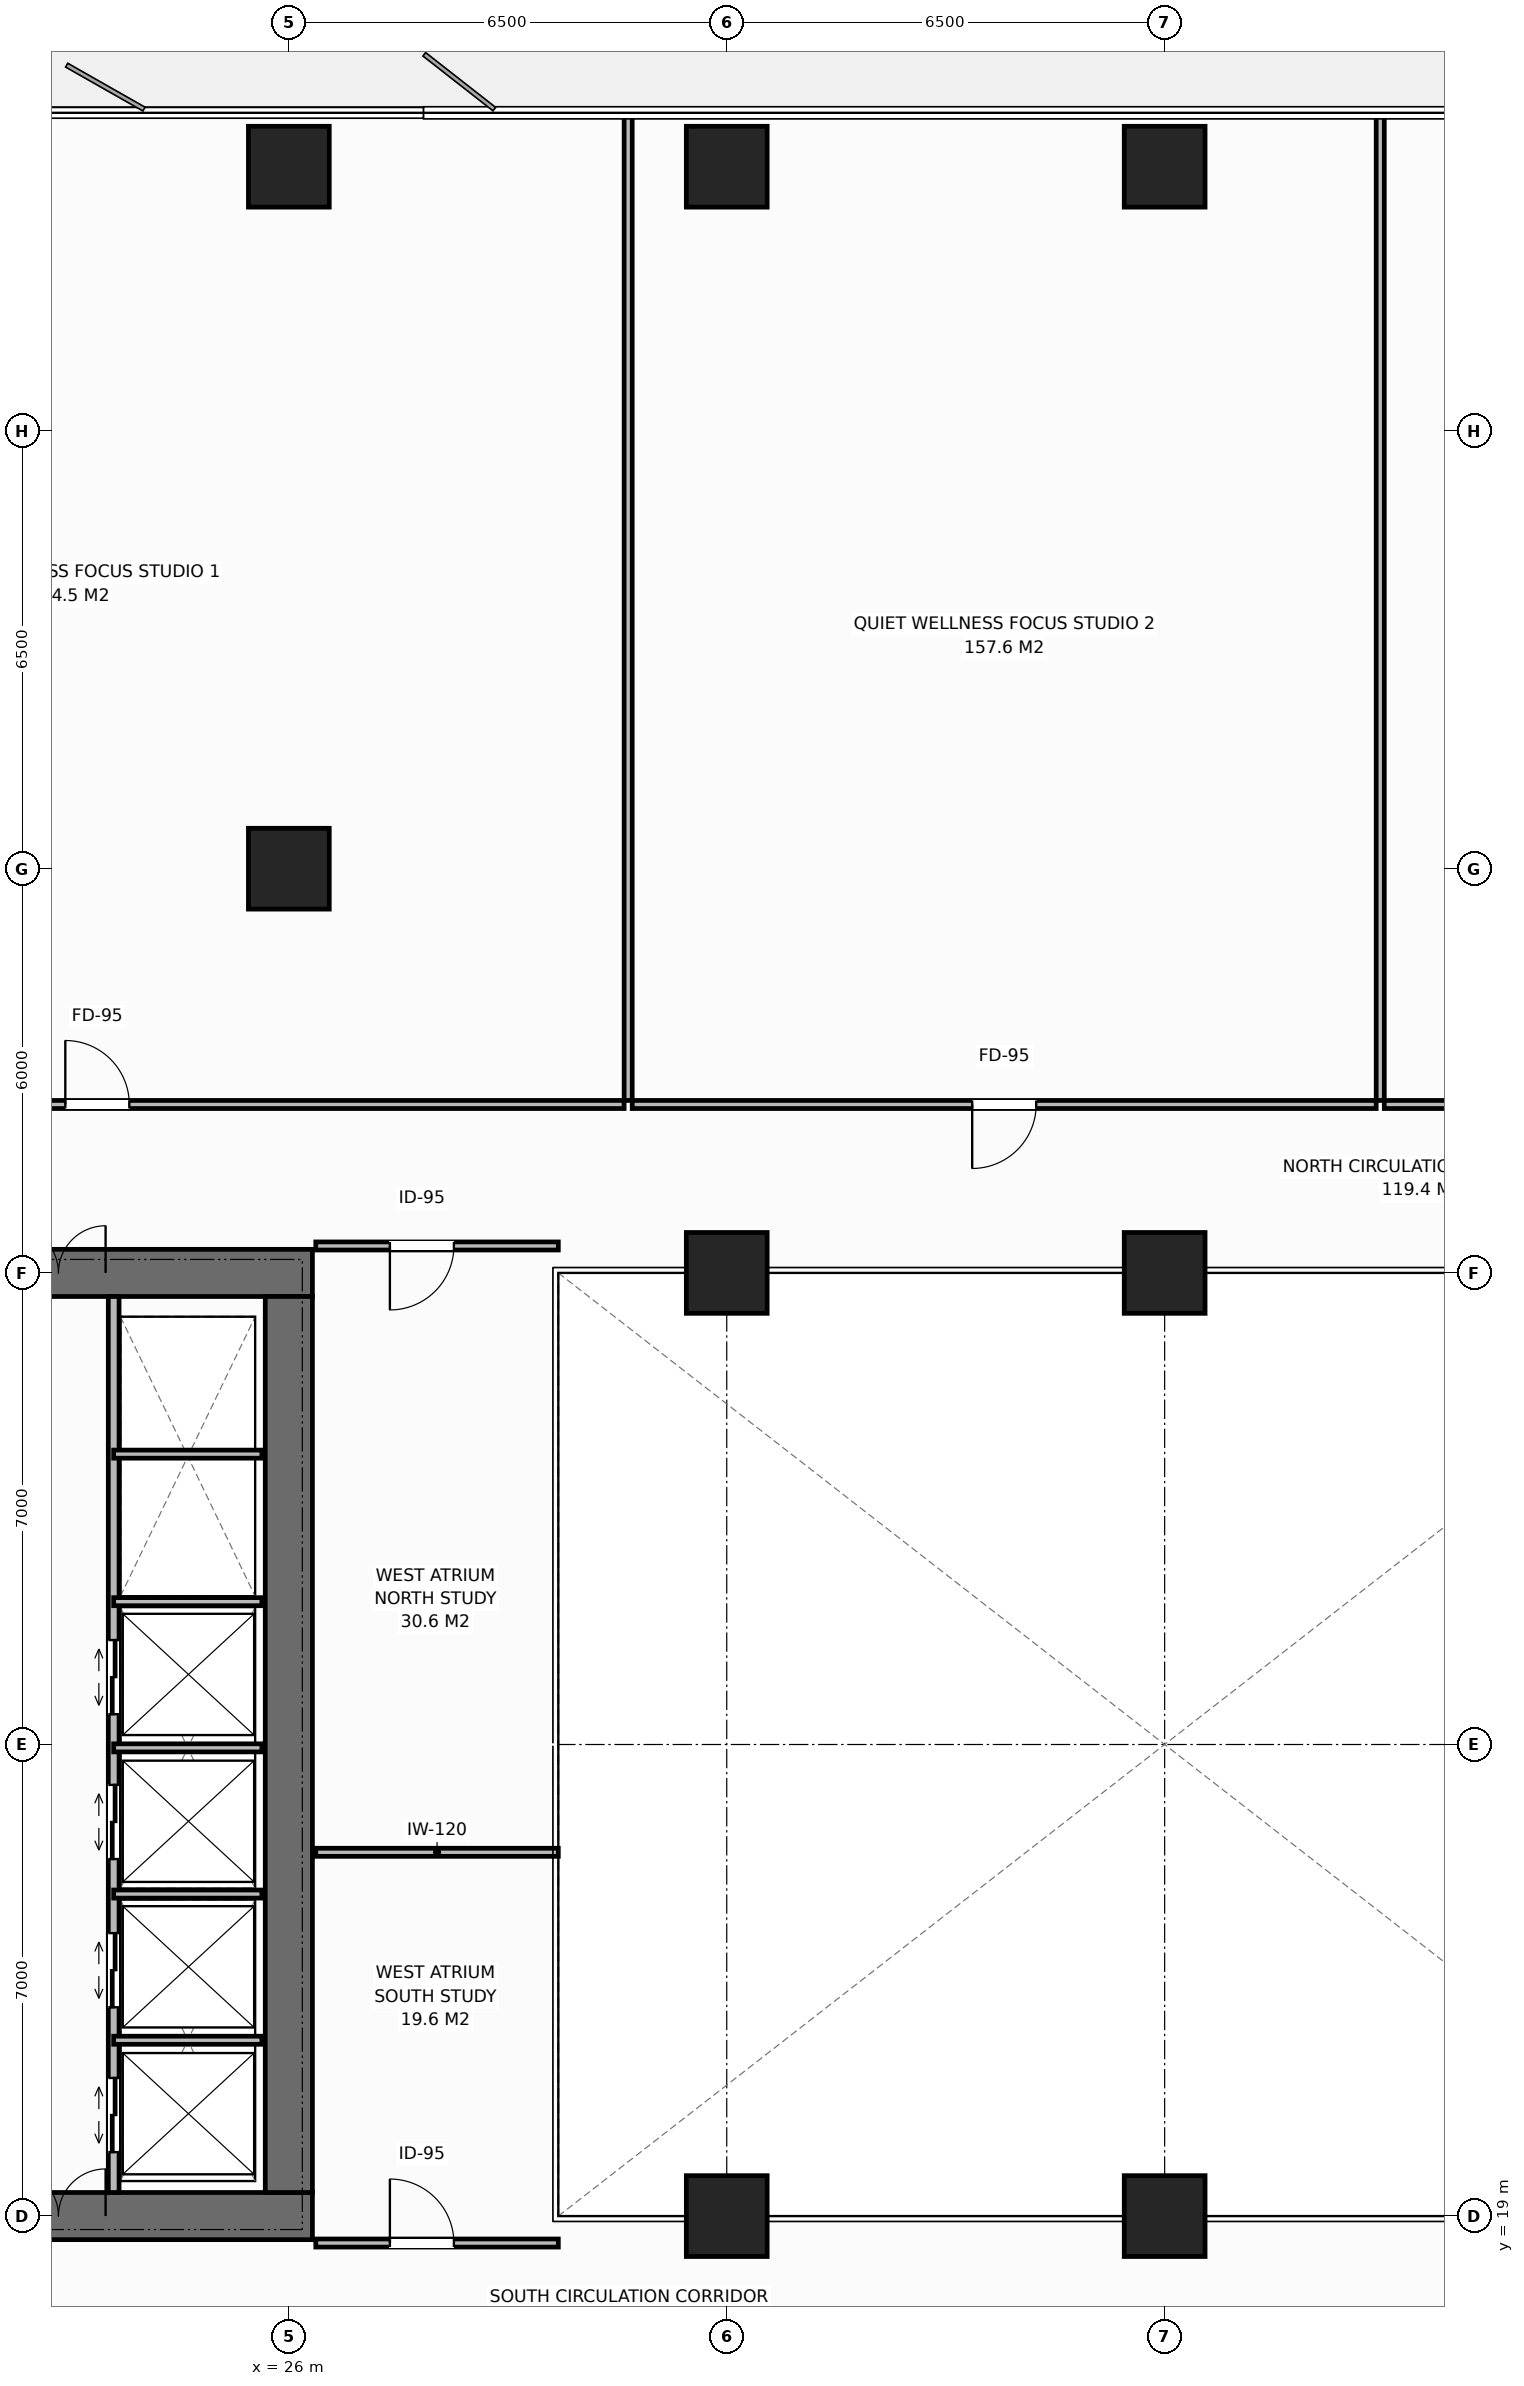
"""IFC4 building model, lengths in metres.
Left out: names, types, materials, properties, quantities, classifications, styles, units other than length and angle.
Written with IfcOpenShell. Run it as: python <this file> out.ifc"""

import sys

from ifc_helpers import new_model, si_unit, direction, frame, frame_2d, origin, origin_2d, place, context, subcontext, project, spatial, rectangle, extrude, element, fill, save


model = new_model("IFC4")
c1 = context("Model", 3, precision=1e-05, world=origin(), true_north=direction((0.0, 1.0)))
c2 = subcontext(c1, "Body", "Model", "MODEL_VIEW")
j1 = project(units=[si_unit("LENGTHUNIT", "METRE"), si_unit("PLANEANGLEUNIT", "RADIAN")], contexts=[c1])
p1 = place(None, origin())
s1 = spatial("IfcSite", under=j1, at=p1, CompositionType="ELEMENT")
p2 = place(p1, origin())
s2 = spatial("IfcBuilding", under=s1, at=p2, CompositionType="ELEMENT")
p3 = place(p2, frame((0.0, 0.0, 86.0)))
s3 = spatial("IfcBuildingStorey", under=s2, at=p3, CompositionType="ELEMENT", Elevation=86.0)
p4 = place(p3, frame((12.65, 19.0, 0.0), z_axis=(0.0, 0.0, 1.0), x_axis=(1.0, 0.0, 0.0)))
e1 = element("IfcWall", 1, at=p4, inside=s3, PredefinedType="SHEAR", context=c2, shape_type="SweptSolid", body=[
    extrude(rectangle(XDim=13.7, YDim=0.7, at=frame_2d((6.85, 0.0))), origin(), (0.0, 0.0, 1.0), 3.8),
])
p5 = place(p4, frame((9.23, 0.0, 0.0)))
e2 = element("IfcOpeningElement", 2, at=p5, cuts=e1, PredefinedType="OPENING", context=c2, shape_type="SweptSolid", body=[
    extrude(rectangle(XDim=1.4, YDim=2.2, at=frame_2d((0.7, 1.1))), frame((0.0, 0.36, 0.0), z_axis=(0.0, -1.0, 0.0), x_axis=(1.0, 0.0, 0.0)), (0.0, 0.0, 1.0), 0.72),
])
p6 = place(p3, frame((12.65, 33.0, 0.0), z_axis=(0.0, 0.0, 1.0), x_axis=(1.0, 0.0, 0.0)))
e3 = element("IfcWall", 3, at=p6, inside=s3, PredefinedType="SHEAR", context=c2, shape_type="SweptSolid", body=[
    extrude(rectangle(XDim=13.7, YDim=0.7, at=frame_2d((6.85, 0.0))), origin(), (0.0, 0.0, 1.0), 3.8),
])
p7 = place(p6, frame((1.25, 0.0, 0.0)))
e4 = element("IfcOpeningElement", 4, at=p7, cuts=e3, PredefinedType="OPENING", context=c2, shape_type="SweptSolid", body=[
    extrude(rectangle(XDim=0.9, YDim=2.15, at=frame_2d((0.45, 1.075))), frame((0.0, 0.36, 0.0), z_axis=(0.0, -1.0, 0.0), x_axis=(1.0, 0.0, 0.0)), (0.0, 0.0, 1.0), 0.72),
])
p8 = place(p6, frame((3.85, 0.0, 0.0)))
e5 = element("IfcOpeningElement", 5, at=p8, cuts=e3, PredefinedType="OPENING", context=c2, shape_type="SweptSolid", body=[
    extrude(rectangle(XDim=0.95, YDim=2.15, at=frame_2d((0.475, 1.075))), frame((0.0, 0.36, 0.0), z_axis=(0.0, -1.0, 0.0), x_axis=(1.0, 0.0, 0.0)), (0.0, 0.0, 1.0), 0.72),
])
p9 = place(p6, frame((6.85, 0.0, 0.0)))
e6 = element("IfcOpeningElement", 6, at=p9, cuts=e3, PredefinedType="OPENING", context=c2, shape_type="SweptSolid", body=[
    extrude(rectangle(XDim=0.95, YDim=2.15, at=frame_2d((0.475, 1.075))), frame((0.0, 0.36, 0.0), z_axis=(0.0, -1.0, 0.0), x_axis=(1.0, 0.0, 0.0)), (0.0, 0.0, 1.0), 0.72),
])
p10 = place(p6, frame((9.23, 0.0, 0.0)))
e7 = element("IfcOpeningElement", 7, at=p10, cuts=e3, PredefinedType="OPENING", context=c2, shape_type="SweptSolid", body=[
    extrude(rectangle(XDim=1.4, YDim=2.2, at=frame_2d((0.7, 1.1))), frame((0.0, 0.36, 0.0), z_axis=(0.0, -1.0, 0.0), x_axis=(1.0, 0.0, 0.0)), (0.0, 0.0, 1.0), 0.72),
])
p11 = place(p3, frame((26.0, 19.35, 0.0), z_axis=(0.0, 0.0, 1.0), x_axis=(0.0, 1.0, 0.0)))
e8 = element("IfcWall", 8, at=p11, inside=s3, PredefinedType="SHEAR", context=c2, shape_type="SweptSolid", body=[
    extrude(rectangle(XDim=13.3, YDim=0.7, at=frame_2d((6.65, 0.0))), origin(), (0.0, 0.0, 1.0), 3.8),
])
for number, where, z_axis, x_axis in (
    (9, (32.5, 19.0, 0.0), (0.0, 0.0, 1.0), (1.0, 0.0, 0.0)),
    (10, (32.5, 33.0, 0.0), (0.0, 0.0, 1.0), (1.0, 0.0, 0.0)),
    (11, (39.0, 19.0, 0.0), (0.0, 0.0, 1.0), (1.0, 0.0, 0.0)),
    (12, (39.0, 33.0, 0.0), (0.0, 0.0, 1.0), (1.0, 0.0, 0.0)),
    (13, (26.0, 39.0, 0.0), (0.0, 0.0, 1.0), (1.0, 0.0, 0.0)),
    (14, (26.0, 49.42, 0.0), (0.0, 0.0, 1.0), (1.0, 0.0, 0.0)),
    (15, (32.5, 49.42, 0.0), (0.0, 0.0, 1.0), (1.0, 0.0, 0.0)),
    (16, (39.0, 49.42, 0.0), (0.0, 0.0, 1.0), (1.0, 0.0, 0.0)),
):
    element("IfcColumn", number, at=place(p3, frame(where, z_axis=z_axis, x_axis=x_axis)), inside=s3, PredefinedType="COLUMN", context=c2, shape_type="SweptSolid", body=[
        extrude(rectangle(XDim=1.2, YDim=1.2, at=origin_2d()), origin(), (0.0, 0.0, 1.0), 3.8),
    ])
p12 = place(p3, frame((23.4, 19.35, 0.0), z_axis=(0.0, 0.0, 1.0), x_axis=(0.0, 1.0, 0.0)))
e17 = element("IfcWall", 17, at=p12, inside=s3, PredefinedType="STANDARD", context=c2, shape_type="SweptSolid", body=[
    extrude(rectangle(XDim=13.3, YDim=0.16, at=frame_2d((6.65, 0.0))), origin(), (0.0, 0.0, 1.0), 3.565),
])
p13 = place(p12, frame((0.6, 0.0, 0.0)))
e18 = element("IfcOpeningElement", 18, at=p13, cuts=e17, PredefinedType="OPENING", context=c2, shape_type="SweptSolid", body=[
    extrude(rectangle(XDim=1.1, YDim=2.2, at=frame_2d((0.55, 1.1))), frame((0.0, 0.09, 0.0), z_axis=(0.0, -1.0, 0.0), x_axis=(1.0, 0.0, 0.0)), (0.0, 0.0, 1.0), 0.18),
])
p14 = place(p12, frame((2.75, 0.0, 0.0)))
e19 = element("IfcOpeningElement", 19, at=p14, cuts=e17, PredefinedType="OPENING", context=c2, shape_type="SweptSolid", body=[
    extrude(rectangle(XDim=1.1, YDim=2.2, at=frame_2d((0.55, 1.1))), frame((0.0, 0.09, 0.0), z_axis=(0.0, -1.0, 0.0), x_axis=(1.0, 0.0, 0.0)), (0.0, 0.0, 1.0), 0.18),
])
p15 = place(p12, frame((4.95, 0.0, 0.0)))
e20 = element("IfcOpeningElement", 20, at=p15, cuts=e17, PredefinedType="OPENING", context=c2, shape_type="SweptSolid", body=[
    extrude(rectangle(XDim=1.1, YDim=2.2, at=frame_2d((0.55, 1.1))), frame((0.0, 0.09, 0.0), z_axis=(0.0, -1.0, 0.0), x_axis=(1.0, 0.0, 0.0)), (0.0, 0.0, 1.0), 0.18),
])
p16 = place(p12, frame((7.1, 0.0, 0.0)))
e21 = element("IfcOpeningElement", 21, at=p16, cuts=e17, PredefinedType="OPENING", context=c2, shape_type="SweptSolid", body=[
    extrude(rectangle(XDim=1.1, YDim=2.2, at=frame_2d((0.55, 1.1))), frame((0.0, 0.09, 0.0), z_axis=(0.0, -1.0, 0.0), x_axis=(1.0, 0.0, 0.0)), (0.0, 0.0, 1.0), 0.18),
])
for number, where, z_axis, x_axis in (
    (22, (23.4, 21.61, 0.0), (0.0, 0.0, 1.0), (1.0, 0.0, 0.0)),
    (23, (23.4, 23.78, 0.0), (0.0, 0.0, 1.0), (1.0, 0.0, 0.0)),
    (24, (23.4, 25.95, 0.0), (0.0, 0.0, 1.0), (1.0, 0.0, 0.0)),
    (25, (23.4, 28.12, 0.0), (0.0, 0.0, 1.0), (1.0, 0.0, 0.0)),
    (26, (23.4, 30.31, 0.0), (0.0, 0.0, 1.0), (1.0, 0.0, 0.0)),
):
    element("IfcWall", number, at=place(p3, frame(where, z_axis=z_axis, x_axis=x_axis)), inside=s3, PredefinedType="PARTITIONING", context=c2, shape_type="SweptSolid", body=[
        extrude(rectangle(XDim=2.2, YDim=0.12, at=frame_2d((1.1, 0.0))), origin(), (0.0, 0.0, 1.0), 3.565),
    ])
p17 = place(p3, frame((26.4, 24.4, 0.0), z_axis=(0.0, 0.0, 1.0), x_axis=(1.0, 0.0, 0.0)))
e27 = element("IfcWall", 27, at=p17, inside=s3, PredefinedType="PARTITIONING", context=c2, shape_type="SweptSolid", body=[
    extrude(rectangle(XDim=3.6, YDim=0.12, at=frame_2d((1.8, 0.0))), origin(), (0.0, 0.0, 1.0), 3.565),
])
p18 = place(p3, frame((26.4, 18.6, 0.0), z_axis=(0.0, 0.0, 1.0), x_axis=(1.0, 0.0, 0.0)))
e28 = element("IfcWall", 28, at=p18, inside=s3, PredefinedType="PARTITIONING", context=c2, shape_type="SweptSolid", body=[
    extrude(rectangle(XDim=3.6, YDim=0.12, at=frame_2d((1.8, 0.0))), origin(), (0.0, 0.0, 1.0), 3.565),
])
p19 = place(p18, frame((1.1, 0.0, 0.0)))
e29 = element("IfcOpeningElement", 29, at=p19, cuts=e28, PredefinedType="OPENING", context=c2, shape_type="SweptSolid", body=[
    extrude(rectangle(XDim=0.95, YDim=2.15, at=frame_2d((0.475, 1.075))), frame((0.0, 0.07, 0.0), z_axis=(0.0, -1.0, 0.0), x_axis=(1.0, 0.0, 0.0)), (0.0, 0.0, 1.0), 0.14),
])
p20 = place(p3, frame((26.4, 33.4, 0.0), z_axis=(0.0, 0.0, 1.0), x_axis=(1.0, 0.0, 0.0)))
e30 = element("IfcWall", 30, at=p20, inside=s3, PredefinedType="PARTITIONING", context=c2, shape_type="SweptSolid", body=[
    extrude(rectangle(XDim=3.6, YDim=0.12, at=frame_2d((1.8, 0.0))), origin(), (0.0, 0.0, 1.0), 3.565),
])
p21 = place(p20, frame((1.1, 0.0, 0.0)))
e31 = element("IfcOpeningElement", 31, at=p21, cuts=e30, PredefinedType="OPENING", context=c2, shape_type="SweptSolid", body=[
    extrude(rectangle(XDim=0.95, YDim=2.15, at=frame_2d((0.475, 1.075))), frame((0.0, 0.07, 0.0), z_axis=(0.0, -1.0, 0.0), x_axis=(1.0, 0.0, 0.0)), (0.0, 0.0, 1.0), 0.14),
])
p22 = place(p3, frame((31.037, 35.56, 0.0), z_axis=(0.0, 0.0, 1.0), x_axis=(0.0, 1.0, 0.0)))
e32 = element("IfcWall", 32, at=p22, inside=s3, PredefinedType="PARTITIONING", context=c2, shape_type="SweptSolid", body=[
    extrude(rectangle(XDim=14.72, YDim=0.12, at=frame_2d((7.36, 0.0))), origin(), (0.0, 0.0, 1.0), 3.565),
])
p23 = place(p3, frame((15.337, 35.5, 0.0), z_axis=(0.0, 0.0, 1.0), x_axis=(1.0, 0.0, 0.0)))
e33 = element("IfcWall", 33, at=p23, inside=s3, PredefinedType="PARTITIONING", context=c2, shape_type="SweptSolid", body=[
    extrude(rectangle(XDim=15.64, YDim=0.12, at=frame_2d((7.82, 0.0))), origin(), (0.0, 0.0, 1.0), 3.565),
])
p24 = place(p23, frame((7.345, 0.0, 0.0)))
e34 = element("IfcOpeningElement", 34, at=p24, cuts=e33, PredefinedType="OPENING", context=c2, shape_type="SweptSolid", body=[
    extrude(rectangle(XDim=0.95, YDim=2.15, at=frame_2d((0.475, 1.075))), frame((0.0, 0.07, 0.0), z_axis=(0.0, -1.0, 0.0), x_axis=(1.0, 0.0, 0.0)), (0.0, 0.0, 1.0), 0.14),
])
p25 = place(p3, frame((42.2, 35.56, 0.0), z_axis=(0.0, 0.0, 1.0), x_axis=(0.0, 1.0, 0.0)))
e35 = element("IfcWall", 35, at=p25, inside=s3, PredefinedType="PARTITIONING", context=c2, shape_type="SweptSolid", body=[
    extrude(rectangle(XDim=14.72, YDim=0.12, at=frame_2d((7.36, 0.0))), origin(), (0.0, 0.0, 1.0), 3.565),
])
p26 = place(p3, frame((31.097, 35.5, 0.0), z_axis=(0.0, 0.0, 1.0), x_axis=(1.0, 0.0, 0.0)))
e36 = element("IfcWall", 36, at=p26, inside=s3, PredefinedType="PARTITIONING", context=c2, shape_type="SweptSolid", body=[
    extrude(rectangle(XDim=11.043, YDim=0.12, at=frame_2d((5.521, 0.0))), origin(), (0.0, 0.0, 1.0), 3.565),
])
p27 = place(p26, frame((5.046, 0.0, 0.0)))
e37 = element("IfcOpeningElement", 37, at=p27, cuts=e36, PredefinedType="OPENING", context=c2, shape_type="SweptSolid", body=[
    extrude(rectangle(XDim=0.95, YDim=2.15, at=frame_2d((0.475, 1.075))), frame((0.0, 0.07, 0.0), z_axis=(0.0, -1.0, 0.0), x_axis=(1.0, 0.0, 0.0)), (0.0, 0.0, 1.0), 0.14),
])
p28 = place(p3, frame((42.26, 35.5, 0.0), z_axis=(0.0, 0.0, 1.0), x_axis=(1.0, 0.0, 0.0)))
e38 = element("IfcWall", 38, at=p28, inside=s3, PredefinedType="PARTITIONING", context=c2, shape_type="SweptSolid", body=[
    extrude(rectangle(XDim=9.32, YDim=0.12, at=frame_2d((4.66, 0.0))), origin(), (0.0, 0.0, 1.0), 3.565),
])
p29 = place(p28, frame((4.185, 0.0, 0.0)))
e39 = element("IfcOpeningElement", 39, at=p29, cuts=e38, PredefinedType="OPENING", context=c2, shape_type="SweptSolid", body=[
    extrude(rectangle(XDim=0.95, YDim=2.15, at=frame_2d((0.475, 1.075))), frame((0.0, 0.07, 0.0), z_axis=(0.0, -1.0, 0.0), x_axis=(1.0, 0.0, 0.0)), (0.0, 0.0, 1.0), 0.14),
])
p30 = place(p5, origin())
e40 = element("IfcDoor", 40, at=p30, inside=s3, OperationType="DOUBLE_DOOR_SINGLE_SWING", PredefinedType="DOOR", context=c2, shape_type="SweptSolid", body=[
    extrude(rectangle(XDim=1.4, YDim=2.2, at=frame_2d((0.7, 1.1))), frame((0.0, 0.125, 0.0), z_axis=(0.0, -1.0, 0.0), x_axis=(1.0, 0.0, 0.0)), (0.0, 0.0, 1.0), 0.05),
])
fill(e2, e40)
p31 = place(p10, origin())
e41 = element("IfcDoor", 41, at=p31, inside=s3, OperationType="DOUBLE_DOOR_SINGLE_SWING", PredefinedType="DOOR", context=c2, shape_type="SweptSolid", body=[
    extrude(rectangle(XDim=1.4, YDim=2.2, at=frame_2d((0.7, 1.1))), frame((0.0, -0.075, 0.0), z_axis=(0.0, -1.0, 0.0), x_axis=(1.0, 0.0, 0.0)), (0.0, 0.0, 1.0), 0.05),
])
fill(e7, e41)
p32 = place(p13, origin())
e42 = element("IfcDoor", 42, at=p32, inside=s3, OperationType="DOUBLE_DOOR_SLIDING", PredefinedType="DOOR", context=c2, shape_type="SweptSolid", body=[
    extrude(rectangle(XDim=1.1, YDim=2.2, at=frame_2d((0.55, 1.1))), frame((0.0, 0.025, 0.0), z_axis=(0.0, -1.0, 0.0), x_axis=(1.0, 0.0, 0.0)), (0.0, 0.0, 1.0), 0.05),
])
fill(e18, e42)
p33 = place(p14, origin())
e43 = element("IfcDoor", 43, at=p33, inside=s3, OperationType="DOUBLE_DOOR_SLIDING", PredefinedType="DOOR", context=c2, shape_type="SweptSolid", body=[
    extrude(rectangle(XDim=1.1, YDim=2.2, at=frame_2d((0.55, 1.1))), frame((0.0, 0.025, 0.0), z_axis=(0.0, -1.0, 0.0), x_axis=(1.0, 0.0, 0.0)), (0.0, 0.0, 1.0), 0.05),
])
fill(e19, e43)
p34 = place(p15, origin())
e44 = element("IfcDoor", 44, at=p34, inside=s3, OperationType="DOUBLE_DOOR_SLIDING", PredefinedType="DOOR", context=c2, shape_type="SweptSolid", body=[
    extrude(rectangle(XDim=1.1, YDim=2.2, at=frame_2d((0.55, 1.1))), frame((0.0, 0.025, 0.0), z_axis=(0.0, -1.0, 0.0), x_axis=(1.0, 0.0, 0.0)), (0.0, 0.0, 1.0), 0.05),
])
fill(e20, e44)
p35 = place(p16, origin())
e45 = element("IfcDoor", 45, at=p35, inside=s3, OperationType="DOUBLE_DOOR_SLIDING", PredefinedType="DOOR", context=c2, shape_type="SweptSolid", body=[
    extrude(rectangle(XDim=1.1, YDim=2.2, at=frame_2d((0.55, 1.1))), frame((0.0, 0.025, 0.0), z_axis=(0.0, -1.0, 0.0), x_axis=(1.0, 0.0, 0.0)), (0.0, 0.0, 1.0), 0.05),
])
fill(e21, e45)
p36 = place(p19, origin())
e46 = element("IfcDoor", 46, at=p36, inside=s3, OperationType="SINGLE_SWING_LEFT", PredefinedType="DOOR", context=c2, shape_type="SweptSolid", body=[
    extrude(rectangle(XDim=0.95, YDim=2.15, at=frame_2d((0.475, 1.075))), frame((0.0, 0.025, 0.0), z_axis=(0.0, -1.0, 0.0), x_axis=(1.0, 0.0, 0.0)), (0.0, 0.0, 1.0), 0.05),
])
fill(e29, e46)
p37 = place(p21, origin())
e47 = element("IfcDoor", 47, at=p37, inside=s3, OperationType="SINGLE_SWING_RIGHT", PredefinedType="DOOR", context=c2, shape_type="SweptSolid", body=[
    extrude(rectangle(XDim=0.95, YDim=2.15, at=frame_2d((0.475, 1.075))), frame((0.0, 0.025, 0.0), z_axis=(0.0, -1.0, 0.0), x_axis=(1.0, 0.0, 0.0)), (0.0, 0.0, 1.0), 0.05),
])
fill(e31, e47)
p38 = place(p24, origin())
e48 = element("IfcDoor", 48, at=p38, inside=s3, OperationType="SINGLE_SWING_LEFT", PredefinedType="DOOR", context=c2, shape_type="SweptSolid", body=[
    extrude(rectangle(XDim=0.95, YDim=2.15, at=frame_2d((0.475, 1.075))), frame((0.0, 0.025, 0.0), z_axis=(0.0, -1.0, 0.0), x_axis=(1.0, 0.0, 0.0)), (0.0, 0.0, 1.0), 0.05),
])
fill(e34, e48)
p39 = place(p27, origin())
e49 = element("IfcDoor", 49, at=p39, inside=s3, OperationType="SINGLE_SWING_RIGHT", PredefinedType="DOOR", context=c2, shape_type="SweptSolid", body=[
    extrude(rectangle(XDim=0.95, YDim=2.15, at=frame_2d((0.475, 1.075))), frame((0.0, 0.025, 0.0), z_axis=(0.0, -1.0, 0.0), x_axis=(1.0, 0.0, 0.0)), (0.0, 0.0, 1.0), 0.05),
])
fill(e37, e49)
save(model, sys.argv[1])
